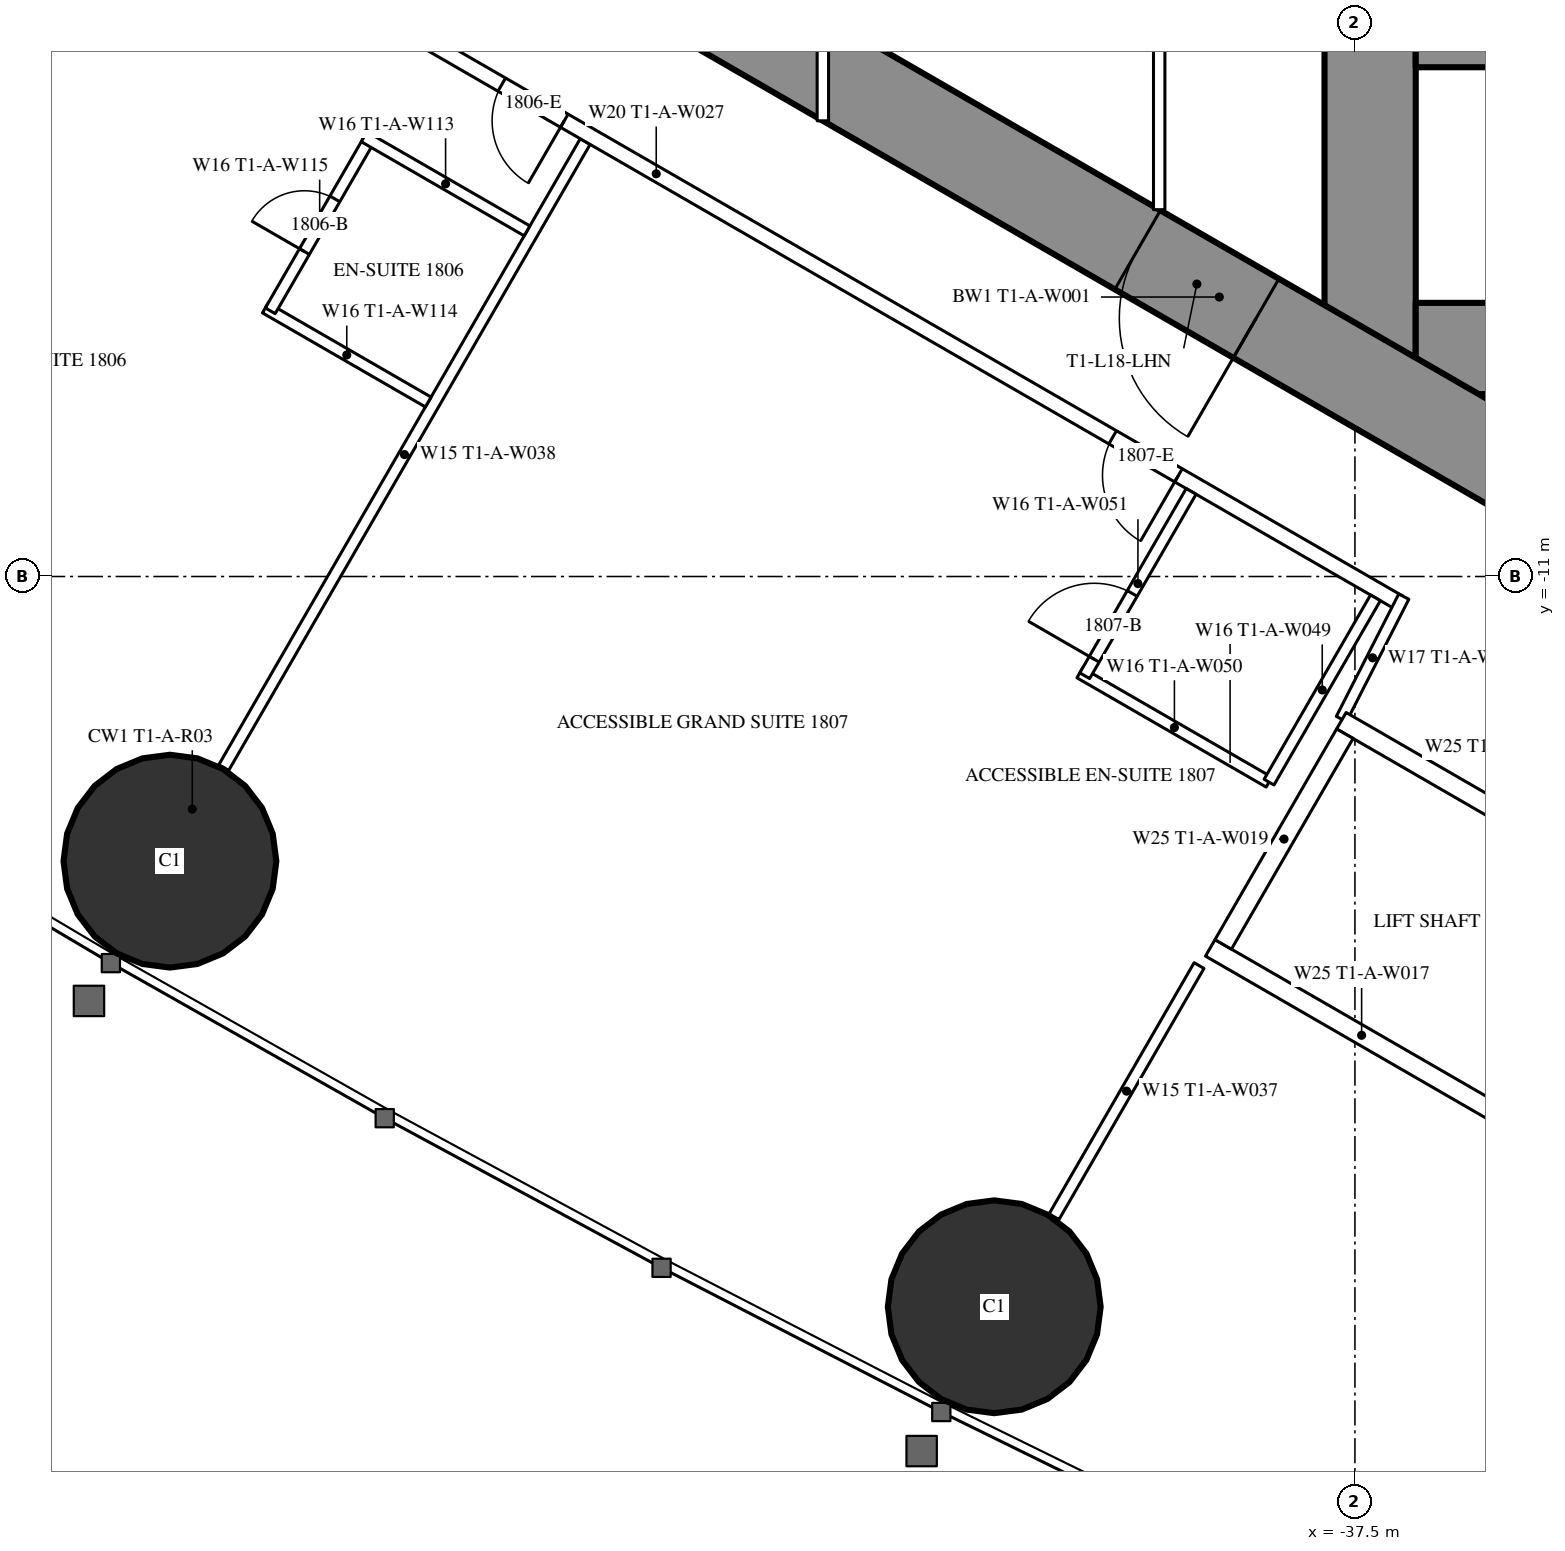
"""IFC4 building model, lengths in metres.
Left out: names, types, materials, properties, quantities, classifications, styles, units other than length and angle.
Written with IfcOpenShell. Run it as: python <this file> out.ifc"""

import sys

from ifc_helpers import new_model, si_unit, direction, frame, frame_2d, origin, origin_2d, place, context, subcontext, project, spatial, rectangle, hollow_circle, extrude, element, fill, save


model = new_model("IFC4")
c1 = context("Model", 3, precision=1e-05, world=origin(), true_north=direction((0.0, 1.0)))
c2 = subcontext(c1, "Body", "Model", "MODEL_VIEW")
j1 = project(units=[si_unit("LENGTHUNIT", "METRE"), si_unit("PLANEANGLEUNIT", "RADIAN")], contexts=[c1])
p1 = place(None, origin())
s1 = spatial("IfcSite", under=j1, at=p1, CompositionType="ELEMENT")
p2 = place(p1, origin())
s2 = spatial("IfcBuilding", under=s1, at=p2, CompositionType="ELEMENT")
p3 = place(p2, frame((0.0, 0.0, 70.5)))
s3 = spatial("IfcBuildingStorey", under=s2, at=p3, CompositionType="ELEMENT", Elevation=70.5)
for number, where, z_axis, x_axis in (
    (1, (-53.09, -14.745, 0.0), (0.0, 0.0, 1.0), (1.0, 0.0, 0.0)),
    (2, (-42.245, -20.607, 0.0), (0.0, 0.0, 1.0), (1.0, 0.0, 0.0)),
):
    element("IfcColumn", number, at=place(p3, frame(where, z_axis=z_axis, x_axis=x_axis)), inside=s3, PredefinedType="COLUMN", context=c2, shape_type="SweptSolid", body=[
        extrude(hollow_circle(Radius=1.4, WallThickness=0.12, at=origin_2d()), origin(), (0.0, 0.0, 1.0), 3.5),
    ])
p4 = place(p3, frame((-37.3, 8.6, 0.0), z_axis=(0.0, 0.0, 1.0), x_axis=(0.0, -1.0, 0.0)))
e3 = element("IfcWall", 3, at=p4, inside=s3, PredefinedType="SHEAR", context=c2, shape_type="SweptSolid", body=[
    extrude(rectangle(XDim=17.2, YDim=1.2, at=frame_2d((8.6, 0.0))), origin(), (0.0, 0.0, 1.0), 3.5),
])
p5 = place(p4, frame((7.7, 0.0, 0.0)))
e4 = element("IfcOpeningElement", 4, at=p5, cuts=e3, PredefinedType="OPENING", context=c2, shape_type="SweptSolid", body=[
    extrude(rectangle(XDim=1.8, YDim=2.2, at=frame_2d((0.9, 1.1))), frame((0.0, 0.61, 0.0), z_axis=(0.0, -1.0, 0.0), x_axis=(1.0, 0.0, 0.0)), (0.0, 0.0, 1.0), 1.22),
])
p6 = place(p3, frame((-28.3, -8.0, 0.0), z_axis=(0.0, 0.0, 1.0), x_axis=(-1.0, 0.0, 0.0)))
e5 = element("IfcWall", 5, at=p6, inside=s3, PredefinedType="SHEAR", context=c2, shape_type="SweptSolid", body=[
    extrude(rectangle(XDim=8.4, YDim=1.2, at=frame_2d((4.2, 0.0))), origin(), (0.0, 0.0, 1.0), 3.5),
])
p7 = place(p6, frame((0.25, 0.0, 0.0)))
e6 = element("IfcOpeningElement", 6, at=p7, cuts=e5, PredefinedType="OPENING", context=c2, shape_type="SweptSolid", body=[
    extrude(rectangle(XDim=1.0, YDim=2.2, at=frame_2d((0.5, 1.1))), frame((0.0, 0.61, 0.0), z_axis=(0.0, -1.0, 0.0), x_axis=(1.0, 0.0, 0.0)), (0.0, 0.0, 1.0), 1.22),
])
p8 = place(p3, frame((-28.3, -4.15, 0.0), z_axis=(0.0, 0.0, 1.0), x_axis=(-1.0, 0.0, 0.0)))
e7 = element("IfcWall", 7, at=p8, inside=s3, PredefinedType="SHEAR", context=c2, shape_type="SweptSolid", body=[
    extrude(rectangle(XDim=8.4, YDim=0.3, at=frame_2d((4.2, 0.0))), origin(), (0.0, 0.0, 1.0), 3.5),
])
p9 = place(p3, frame((-27.2, -14.3, 0.0), z_axis=(0.0, 0.0, 1.0), x_axis=(-0.866024021859, 0.500002393557, 0.0)))
e8 = element("IfcWall", 8, at=p9, inside=s3, PredefinedType="SHEAR", context=c2, shape_type="SweptSolid", body=[
    extrude(rectangle(XDim=27.907, YDim=1.2, at=frame_2d((13.954, 0.0))), origin(), (0.0, 0.0, 1.0), 3.5),
])
p10 = place(p9, frame((4.6, 0.0, 0.0)))
e9 = element("IfcOpeningElement", 9, at=p10, cuts=e8, PredefinedType="OPENING", context=c2, shape_type="SweptSolid", body=[
    extrude(rectangle(XDim=1.0, YDim=2.2, at=frame_2d((0.5, 1.1))), frame((0.0, 0.61, 0.0), z_axis=(0.0, -1.0, 0.0), x_axis=(1.0, 0.0, 0.0)), (0.0, 0.0, 1.0), 1.22),
])
p11 = place(p9, frame((13.395, 0.0, 0.0)))
e10 = element("IfcOpeningElement", 10, at=p11, cuts=e8, PredefinedType="OPENING", context=c2, shape_type="SweptSolid", body=[
    extrude(rectangle(XDim=1.8, YDim=2.2, at=frame_2d((0.9, 1.1))), frame((0.0, 0.61, 0.0), z_axis=(0.0, -1.0, 0.0), x_axis=(1.0, 0.0, 0.0)), (0.0, 0.0, 1.0), 1.22),
])
p12 = place(p3, frame((-47.627, -5.278, 0.0), z_axis=(0.0, 0.0, 1.0), x_axis=(-0.500009844318, -0.86601972009, 0.0)))
e11 = element("IfcWall", 11, at=p12, inside=s3, PredefinedType="PARTITIONING", context=c2, shape_type="SweptSolid", body=[
    extrude(rectangle(XDim=9.51, YDim=0.15, at=frame_2d((4.755, 0.0))), origin(), (0.0, 0.0, 1.0), 2.25),
])
p13 = place(p3, frame((-39.551, -16.118, 0.0), z_axis=(0.0, 0.0, 1.0), x_axis=(-0.499986503906, -0.866033195618, 0.0)))
e12 = element("IfcWall", 12, at=p13, inside=s3, PredefinedType="PARTITIONING", context=c2, shape_type="SweptSolid", body=[
    extrude(rectangle(XDim=3.815, YDim=0.15, at=frame_2d((1.907, 0.0))), origin(), (0.0, 0.0, 1.0), 3.25),
])
p14 = place(p3, frame((-36.92, -11.344, 0.0), z_axis=(0.0, 0.0, 1.0), x_axis=(-0.866028313256, 0.499994960614, 0.0)))
e13 = element("IfcWall", 13, at=p14, inside=s3, PredefinedType="PARTITIONING", context=c2, shape_type="SweptSolid", body=[
    extrude(rectangle(XDim=22.568, YDim=0.2, at=frame_2d((11.284, 0.0))), origin(), (0.0, 0.0, 1.0), 3.25),
])
p15 = place(p14, frame((20.958, 0.0, 0.0)))
e14 = element("IfcOpeningElement", 14, at=p15, cuts=e13, PredefinedType="OPENING", context=c2, shape_type="SweptSolid", body=[
    extrude(rectangle(XDim=0.95, YDim=2.2, at=frame_2d((0.475, 1.1))), frame((0.0, 0.11, 0.0), z_axis=(0.0, -1.0, 0.0), x_axis=(1.0, 0.0, 0.0)), (0.0, 0.0, 1.0), 0.22),
])
p16 = place(p14, frame((12.68, 0.0, 0.0)))
e15 = element("IfcOpeningElement", 15, at=p16, cuts=e13, PredefinedType="OPENING", context=c2, shape_type="SweptSolid", body=[
    extrude(rectangle(XDim=0.95, YDim=2.2, at=frame_2d((0.475, 1.1))), frame((0.0, 0.11, 0.0), z_axis=(0.0, -1.0, 0.0), x_axis=(1.0, 0.0, 0.0)), (0.0, 0.0, 1.0), 0.22),
])
p17 = place(p14, frame((3.35, 0.0, 0.0)))
e16 = element("IfcOpeningElement", 16, at=p17, cuts=e13, PredefinedType="OPENING", context=c2, shape_type="SweptSolid", body=[
    extrude(rectangle(XDim=1.0, YDim=2.2, at=frame_2d((0.5, 1.1))), frame((0.0, 0.11, 0.0), z_axis=(0.0, -1.0, 0.0), x_axis=(1.0, 0.0, 0.0)), (0.0, 0.0, 1.0), 0.22),
])
p18 = place(p3, frame((-36.857, -11.265, 0.0), z_axis=(0.0, 0.0, 1.0), x_axis=(-0.454225294761, -0.890886851176, 0.0)))
e17 = element("IfcWall", 17, at=p18, inside=s3, PredefinedType="PARTITIONING", context=c2, shape_type="SweptSolid", body=[
    extrude(rectangle(XDim=1.807, YDim=0.15, at=frame_2d((0.904, 0.0))), origin(), (0.0, 0.0, 1.0), 3.25),
])
p19 = place(p3, frame((-49.692, -8.704, 0.0), z_axis=(0.0, 0.0, 1.0), x_axis=(-0.866073894602, 0.499916002032, 0.0)))
e18 = element("IfcWall", 18, at=p19, inside=s3, PredefinedType="PARTITIONING", context=c2, shape_type="SweptSolid", body=[
    extrude(rectangle(XDim=2.475, YDim=0.15, at=frame_2d((1.238, 0.0))), origin(), (0.0, 0.0, 1.0), 3.25),
])
p20 = place(p3, frame((-50.47, -5.253, 0.0), z_axis=(0.0, 0.0, 1.0), x_axis=(-0.500006934395, -0.866021400173, 0.0)))
e19 = element("IfcWall", 19, at=p20, inside=s3, PredefinedType="PARTITIONING", context=c2, shape_type="SweptSolid", body=[
    extrude(rectangle(XDim=2.6, YDim=0.15, at=frame_2d((1.3, 0.0))), origin(), (0.0, 0.0, 1.0), 3.25),
])
p21 = place(p20, frame((0.9, 0.0, 0.0)))
e20 = element("IfcOpeningElement", 20, at=p21, cuts=e19, PredefinedType="OPENING", context=c2, shape_type="SweptSolid", body=[
    extrude(rectangle(XDim=0.8, YDim=2.2, at=frame_2d((0.4, 1.1))), frame((0.0, 0.085, 0.0), z_axis=(0.0, -1.0, 0.0), x_axis=(1.0, 0.0, 0.0)), (0.0, 0.0, 1.0), 0.17),
])
p22 = place(p3, frame((-48.392, -6.453, 0.0), z_axis=(0.0, 0.0, 1.0), x_axis=(-0.86604923931, 0.499958713387, 0.0)))
e21 = element("IfcWall", 21, at=p22, inside=s3, PredefinedType="PARTITIONING", context=c2, shape_type="SweptSolid", body=[
    extrude(rectangle(XDim=2.475, YDim=0.15, at=frame_2d((1.237, 0.0))), origin(), (0.0, 0.0, 1.0), 3.25),
])
p23 = place(p3, frame((-38.63, -13.705, 0.0), z_axis=(0.0, 0.0, 1.0), x_axis=(-0.866018712932, 0.500011588718, 0.0)))
e22 = element("IfcWall", 22, at=p23, inside=s3, PredefinedType="PARTITIONING", context=c2, shape_type="SweptSolid", body=[
    extrude(rectangle(XDim=2.875, YDim=0.15, at=frame_2d((1.438, 0.0))), origin(), (0.0, 0.0, 1.0), 3.25),
])
p24 = place(p3, frame((-39.655, -9.88, 0.0), z_axis=(0.0, 0.0, 1.0), x_axis=(-0.500049511043, -0.865996816683, 0.0)))
e23 = element("IfcWall", 23, at=p24, inside=s3, PredefinedType="PARTITIONING", context=c2, shape_type="SweptSolid", body=[
    extrude(rectangle(XDim=2.8, YDim=0.15, at=frame_2d((1.4, 0.0))), origin(), (0.0, 0.0, 1.0), 3.25),
])
p25 = place(p24, frame((1.55, 0.0, 0.0)))
e24 = element("IfcOpeningElement", 24, at=p25, cuts=e23, PredefinedType="OPENING", context=c2, shape_type="SweptSolid", body=[
    extrude(rectangle(XDim=1.0, YDim=2.2, at=frame_2d((0.5, 1.1))), frame((0.0, 0.085, 0.0), z_axis=(0.0, -1.0, 0.0), x_axis=(1.0, 0.0, 0.0)), (0.0, 0.0, 1.0), 0.17),
])
p26 = place(p3, frame((-37.23, -11.281, 0.0), z_axis=(0.0, 0.0, 1.0), x_axis=(-0.500049511043, -0.865996816683, 0.0)))
e25 = element("IfcWall", 25, at=p26, inside=s3, PredefinedType="PARTITIONING", context=c2, shape_type="SweptSolid", body=[
    extrude(rectangle(XDim=2.8, YDim=0.15, at=frame_2d((1.4, 0.0))), origin(), (0.0, 0.0, 1.0), 3.25),
])
p27 = place(p3, frame((-40.075, 1.2, 0.0), z_axis=(0.0, 0.0, 1.0), x_axis=(0.0, -1.0, 0.0)))
e26 = element("IfcWall", 26, at=p27, inside=s3, PredefinedType="PARTITIONING", context=c2, shape_type="SweptSolid", body=[
    extrude(rectangle(XDim=7.374, YDim=0.15, at=frame_2d((3.687, 0.0))), origin(), (0.0, 0.0, 1.0), 3.25),
])
p28 = place(p27, frame((2.787, 0.0, 0.0)))
e27 = element("IfcOpeningElement", 27, at=p28, cuts=e26, PredefinedType="OPENING", context=c2, shape_type="SweptSolid", body=[
    extrude(rectangle(XDim=1.8, YDim=2.2, at=frame_2d((0.9, 1.1))), frame((0.0, 0.085, 0.0), z_axis=(0.0, -1.0, 0.0), x_axis=(1.0, 0.0, 0.0)), (0.0, 0.0, 1.0), 0.17),
])
p29 = place(p3, frame((-44.5, 5.005, 0.0), z_axis=(0.0, 0.0, 1.0), x_axis=(0.0, -1.0, 0.0)))
e28 = element("IfcWall", 28, at=p29, inside=s3, PredefinedType="PARTITIONING", context=c2, shape_type="SweptSolid", body=[
    extrude(rectangle(XDim=10.009, YDim=0.15, at=frame_2d((5.005, 0.0))), origin(), (0.0, 0.0, 1.0), 2.45),
])
p30 = place(p29, frame((2.002, 0.0, 0.0)))
e29 = element("IfcOpeningElement", 29, at=p30, cuts=e28, PredefinedType="OPENING", context=c2, shape_type="SweptSolid", body=[
    extrude(rectangle(XDim=1.0, YDim=2.2, at=frame_2d((0.5, 1.1))), frame((0.0, 0.085, 0.0), z_axis=(0.0, -1.0, 0.0), x_axis=(1.0, 0.0, 0.0)), (0.0, 0.0, 1.0), 0.17),
])
p31 = place(p29, frame((7.007, 0.0, 0.0)))
e30 = element("IfcOpeningElement", 30, at=p31, cuts=e28, PredefinedType="OPENING", context=c2, shape_type="SweptSolid", body=[
    extrude(rectangle(XDim=1.0, YDim=2.2, at=frame_2d((0.5, 1.1))), frame((0.0, 0.085, 0.0), z_axis=(0.0, -1.0, 0.0), x_axis=(1.0, 0.0, 0.0)), (0.0, 0.0, 1.0), 0.17),
])
p32 = place(p3, frame((-33.696, -15.197, 0.0), z_axis=(0.0, 0.0, 1.0), x_axis=(-0.865976953817, 0.500083908417, 0.0)))
e31 = element("IfcWall", 31, at=p32, inside=s3, PredefinedType="PARTITIONING", context=c2, shape_type="SweptSolid", body=[
    extrude(rectangle(XDim=4.599, YDim=0.25, at=frame_2d((2.3, 0.0))), origin(), (0.0, 0.0, 1.0), 3.25),
])
p33 = place(p3, frame((-35.42, -18.186, 0.0), z_axis=(0.0, 0.0, 1.0), x_axis=(-0.865990227814, 0.50006092162, 0.0)))
e32 = element("IfcWall", 32, at=p33, inside=s3, PredefinedType="PARTITIONING", context=c2, shape_type="SweptSolid", body=[
    extrude(rectangle(XDim=4.6, YDim=0.25, at=frame_2d((2.3, 0.0))), origin(), (0.0, 0.0, 1.0), 3.25),
])
p34 = place(p3, frame((-37.633, -13.068, 0.0), z_axis=(0.0, 0.0, 1.0), x_axis=(-0.499872130319, -0.866099216793, 0.0)))
e33 = element("IfcWall", 33, at=p34, inside=s3, PredefinedType="PARTITIONING", context=c2, shape_type="SweptSolid", body=[
    extrude(rectangle(XDim=3.2, YDim=0.25, at=frame_2d((1.6, 0.0))), origin(), (0.0, 0.0, 1.0), 3.25),
])
p35 = place(p21, origin())
e34 = element("IfcDoor", 34, at=p35, inside=s3, OperationType="SINGLE_SWING_RIGHT", PredefinedType="DOOR", context=c2, shape_type="SweptSolid", body=[
    extrude(rectangle(XDim=0.8, YDim=2.2, at=frame_2d((0.4, 1.1))), frame((0.0, 0.025, 0.0), z_axis=(0.0, -1.0, 0.0), x_axis=(1.0, 0.0, 0.0)), (0.0, 0.0, 1.0), 0.05),
])
fill(e20, e34)
p36 = place(p16, origin())
e35 = element("IfcDoor", 35, at=p36, inside=s3, OperationType="SINGLE_SWING_LEFT", PredefinedType="DOOR", context=c2, shape_type="SweptSolid", body=[
    extrude(rectangle(XDim=0.95, YDim=2.2, at=frame_2d((0.475, 1.1))), frame((0.0, 0.025, 0.0), z_axis=(0.0, -1.0, 0.0), x_axis=(1.0, 0.0, 0.0)), (0.0, 0.0, 1.0), 0.05),
])
fill(e15, e35)
p37 = place(p25, origin())
e36 = element("IfcDoor", 36, at=p37, inside=s3, OperationType="SINGLE_SWING_RIGHT", PredefinedType="DOOR", context=c2, shape_type="SweptSolid", body=[
    extrude(rectangle(XDim=1.0, YDim=2.2, at=frame_2d((0.5, 1.1))), frame((0.0, 0.025, 0.0), z_axis=(0.0, -1.0, 0.0), x_axis=(1.0, 0.0, 0.0)), (0.0, 0.0, 1.0), 0.05),
])
fill(e24, e36)
p38 = place(p17, origin())
e37 = element("IfcDoor", 37, at=p38, inside=s3, OperationType="SINGLE_SWING_LEFT", PredefinedType="DOOR", context=c2, shape_type="SweptSolid", body=[
    extrude(rectangle(XDim=1.0, YDim=2.2, at=frame_2d((0.5, 1.1))), frame((0.0, 0.025, 0.0), z_axis=(0.0, -1.0, 0.0), x_axis=(1.0, 0.0, 0.0)), (0.0, 0.0, 1.0), 0.05),
])
fill(e16, e37)
p39 = place(p11, origin())
e38 = element("IfcDoor", 38, at=p39, inside=s3, OperationType="DOUBLE_DOOR_SINGLE_SWING", PredefinedType="DOOR", context=c2, shape_type="SweptSolid", body=[
    extrude(rectangle(XDim=1.8, YDim=2.2, at=frame_2d((0.9, 1.1))), frame((0.0, 0.025, 0.0), z_axis=(0.0, -1.0, 0.0), x_axis=(1.0, 0.0, 0.0)), (0.0, 0.0, 1.0), 0.05),
])
fill(e10, e38)
save(model, sys.argv[1])
